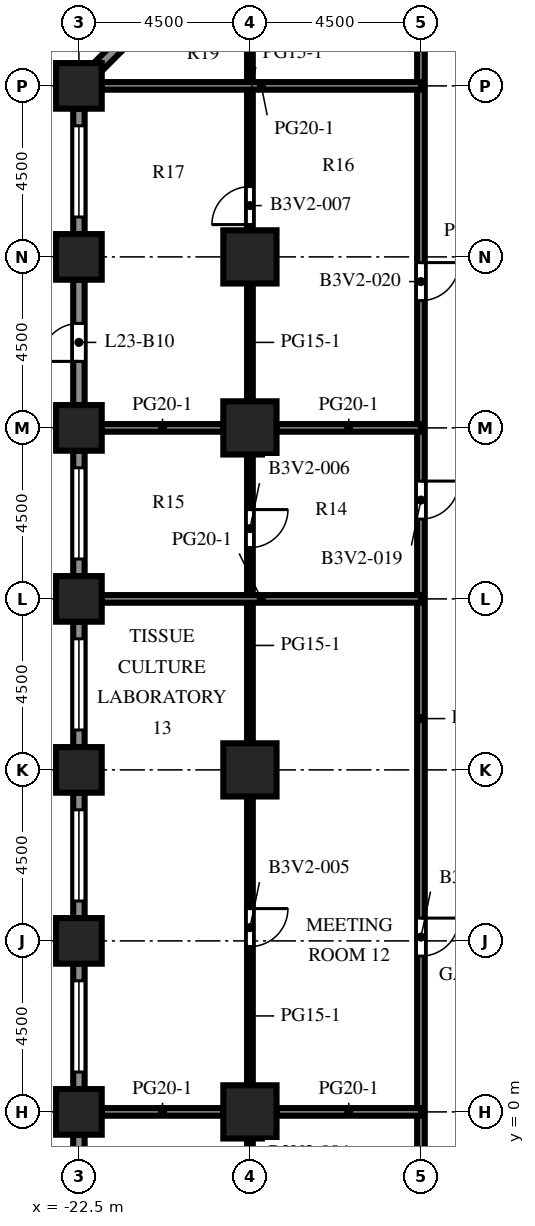
"""IFC4 building model, lengths in metres.
Left out: names, types, materials, properties, quantities, classifications, styles, units other than length and angle.
Written with IfcOpenShell. Run it as: python <this file> out.ifc"""

import sys

from ifc_helpers import new_model, si_unit, direction, frame, frame_2d, origin, origin_2d, place, context, subcontext, project, spatial, rectangle, extrude, element, fill, save


model = new_model("IFC4")
c1 = context("Model", 3, precision=1e-05, world=origin(), true_north=direction((0.0, 1.0)))
c2 = subcontext(c1, "Body", "Model", "MODEL_VIEW")
j1 = project(units=[si_unit("LENGTHUNIT", "METRE"), si_unit("PLANEANGLEUNIT", "RADIAN")], contexts=[c1])
p1 = place(None, origin())
s1 = spatial("IfcSite", under=j1, at=p1, CompositionType="ELEMENT")
p2 = place(p1, origin())
s2 = spatial("IfcBuilding", under=s1, at=p2, CompositionType="ELEMENT")
p3 = place(p2, frame((0.0, 0.0, 102.5)))
s3 = spatial("IfcBuildingStorey", under=s2, at=p3, CompositionType="ELEMENT", Elevation=102.5)
for number, where, z_axis, x_axis in (
    (1, (-22.5, 0.0, 0.0), (0.0, 0.0, 1.0), (1.0, 0.0, 0.0)),
    (2, (-22.5, 4.5, 0.0), (0.0, 0.0, 1.0), (1.0, 0.0, 0.0)),
    (3, (-22.5, 9.0, 0.0), (0.0, 0.0, 1.0), (1.0, 0.0, 0.0)),
    (4, (-22.5, 13.5, 0.0), (0.0, 0.0, 1.0), (1.0, 0.0, 0.0)),
    (5, (-22.5, 18.0, 0.0), (0.0, 0.0, 1.0), (1.0, 0.0, 0.0)),
    (6, (-22.5, 22.5, 0.0), (0.0, 0.0, 1.0), (1.0, 0.0, 0.0)),
    (7, (-22.5, 27.0, 0.0), (0.0, 0.0, 1.0), (1.0, 0.0, 0.0)),
):
    element("IfcColumn", number, at=place(p3, frame(where, z_axis=z_axis, x_axis=x_axis)), inside=s3, PredefinedType="COLUMN", context=c2, shape_type="SweptSolid", body=[
        extrude(rectangle(XDim=1.2, YDim=1.2, at=origin_2d()), origin(), (0.0, 0.0, 1.0), 4.1),
    ])
for number, where, z_axis, x_axis in (
    (8, (-18.0, 0.0, 0.0), (0.0, 0.0, 1.0), (1.0, 0.0, 0.0)),
    (9, (-18.0, 9.0, 0.0), (0.0, 0.0, 1.0), (1.0, 0.0, 0.0)),
    (10, (-18.0, 18.0, 0.0), (0.0, 0.0, 1.0), (1.0, 0.0, 0.0)),
    (11, (-18.0, 22.5, 0.0), (0.0, 0.0, 1.0), (1.0, 0.0, 0.0)),
):
    element("IfcColumn", number, at=place(p3, frame(where, z_axis=z_axis, x_axis=x_axis)), inside=s3, PredefinedType="COLUMN", context=c2, shape_type="SweptSolid", body=[
        extrude(rectangle(XDim=1.4, YDim=1.4, at=origin_2d()), origin(), (0.0, 0.0, 1.0), 4.1),
    ])
p4 = place(p3, frame((-22.006, 27.494, 0.0), z_axis=(0.0, 0.0, 1.0), x_axis=(0.707106781187, 0.707106781187, 0.0)))
e12 = element("IfcWall", 12, at=p4, inside=s3, PredefinedType="SOLIDWALL", context=c2, shape_type="SweptSolid", body=[
    extrude(rectangle(XDim=4.967, YDim=0.3, at=frame_2d((2.483, 0.0))), origin(), (0.0, 0.0, 1.0), 2.75),
])
p5 = place(p4, frame((1.884, 0.0, 0.0)))
e13 = element("IfcOpeningElement", 13, at=p5, cuts=e12, PredefinedType="OPENING", context=c2, shape_type="SweptSolid", body=[
    extrude(rectangle(XDim=1.2, YDim=2.2, at=frame_2d((0.6, 1.1))), frame((0.0, 0.16, 0.0), z_axis=(0.0, -1.0, 0.0), x_axis=(1.0, 0.0, 0.0)), (0.0, 0.0, 1.0), 0.32),
])
p6 = place(p3, frame((-22.5, 23.1, 0.0), z_axis=(0.0, 0.0, 1.0), x_axis=(0.0, 1.0, 0.0)))
e14 = element("IfcWall", 14, at=p6, inside=s3, PredefinedType="SOLIDWALL", context=c2, shape_type="SweptSolid", body=[
    extrude(rectangle(XDim=3.3, YDim=0.3, at=frame_2d((1.65, 0.0))), origin(), (0.0, 0.0, 1.0), 2.75),
])
p7 = place(p6, frame((0.45, 0.0, 0.8)))
e15 = element("IfcOpeningElement", 15, at=p7, cuts=e14, PredefinedType="OPENING", context=c2, shape_type="SweptSolid", body=[
    extrude(rectangle(XDim=2.4, YDim=1.7, at=frame_2d((1.2, 0.85))), frame((0.0, 0.16, 0.0), z_axis=(0.0, -1.0, 0.0), x_axis=(1.0, 0.0, 0.0)), (0.0, 0.0, 1.0), 0.32),
])
p8 = place(p3, frame((-22.5, 18.6, 0.0), z_axis=(0.0, 0.0, 1.0), x_axis=(0.0, 1.0, 0.0)))
e16 = element("IfcWall", 16, at=p8, inside=s3, PredefinedType="SOLIDWALL", context=c2, shape_type="SweptSolid", body=[
    extrude(rectangle(XDim=3.3, YDim=0.3, at=frame_2d((1.65, 0.0))), origin(), (0.0, 0.0, 1.0), 2.75),
])
p9 = place(p8, frame((1.15, 0.0, 0.0)))
e17 = element("IfcOpeningElement", 17, at=p9, cuts=e16, PredefinedType="OPENING", context=c2, shape_type="SweptSolid", body=[
    extrude(rectangle(XDim=1.0, YDim=2.2, at=frame_2d((0.5, 1.1))), frame((0.0, 0.16, 0.0), z_axis=(0.0, -1.0, 0.0), x_axis=(1.0, 0.0, 0.0)), (0.0, 0.0, 1.0), 0.32),
])
p10 = place(p3, frame((-22.5, 14.1, 0.0), z_axis=(0.0, 0.0, 1.0), x_axis=(0.0, 1.0, 0.0)))
e18 = element("IfcWall", 18, at=p10, inside=s3, PredefinedType="SOLIDWALL", context=c2, shape_type="SweptSolid", body=[
    extrude(rectangle(XDim=3.3, YDim=0.3, at=frame_2d((1.65, 0.0))), origin(), (0.0, 0.0, 1.0), 2.75),
])
p11 = place(p10, frame((0.45, 0.0, 0.8)))
e19 = element("IfcOpeningElement", 19, at=p11, cuts=e18, PredefinedType="OPENING", context=c2, shape_type="SweptSolid", body=[
    extrude(rectangle(XDim=2.4, YDim=1.7, at=frame_2d((1.2, 0.85))), frame((0.0, 0.16, 0.0), z_axis=(0.0, -1.0, 0.0), x_axis=(1.0, 0.0, 0.0)), (0.0, 0.0, 1.0), 0.32),
])
p12 = place(p3, frame((-22.5, 9.6, 0.0), z_axis=(0.0, 0.0, 1.0), x_axis=(0.0, 1.0, 0.0)))
e20 = element("IfcWall", 20, at=p12, inside=s3, PredefinedType="SOLIDWALL", context=c2, shape_type="SweptSolid", body=[
    extrude(rectangle(XDim=3.3, YDim=0.3, at=frame_2d((1.65, 0.0))), origin(), (0.0, 0.0, 1.0), 2.75),
])
p13 = place(p12, frame((0.45, 0.0, 0.8)))
e21 = element("IfcOpeningElement", 21, at=p13, cuts=e20, PredefinedType="OPENING", context=c2, shape_type="SweptSolid", body=[
    extrude(rectangle(XDim=2.4, YDim=1.7, at=frame_2d((1.2, 0.85))), frame((0.0, 0.16, 0.0), z_axis=(0.0, -1.0, 0.0), x_axis=(1.0, 0.0, 0.0)), (0.0, 0.0, 1.0), 0.32),
])
p14 = place(p3, frame((-22.5, 5.1, 0.0), z_axis=(0.0, 0.0, 1.0), x_axis=(0.0, 1.0, 0.0)))
e22 = element("IfcWall", 22, at=p14, inside=s3, PredefinedType="SOLIDWALL", context=c2, shape_type="SweptSolid", body=[
    extrude(rectangle(XDim=3.3, YDim=0.3, at=frame_2d((1.65, 0.0))), origin(), (0.0, 0.0, 1.0), 2.75),
])
p15 = place(p14, frame((0.45, 0.0, 0.8)))
e23 = element("IfcOpeningElement", 23, at=p15, cuts=e22, PredefinedType="OPENING", context=c2, shape_type="SweptSolid", body=[
    extrude(rectangle(XDim=2.4, YDim=1.7, at=frame_2d((1.2, 0.85))), frame((0.0, 0.16, 0.0), z_axis=(0.0, -1.0, 0.0), x_axis=(1.0, 0.0, 0.0)), (0.0, 0.0, 1.0), 0.32),
])
p16 = place(p3, frame((-22.5, 0.6, 0.0), z_axis=(0.0, 0.0, 1.0), x_axis=(0.0, 1.0, 0.0)))
e24 = element("IfcWall", 24, at=p16, inside=s3, PredefinedType="SOLIDWALL", context=c2, shape_type="SweptSolid", body=[
    extrude(rectangle(XDim=3.3, YDim=0.3, at=frame_2d((1.65, 0.0))), origin(), (0.0, 0.0, 1.0), 2.75),
])
p17 = place(p16, frame((0.45, 0.0, 0.8)))
e25 = element("IfcOpeningElement", 25, at=p17, cuts=e24, PredefinedType="OPENING", context=c2, shape_type="SweptSolid", body=[
    extrude(rectangle(XDim=2.4, YDim=1.7, at=frame_2d((1.2, 0.85))), frame((0.0, 0.16, 0.0), z_axis=(0.0, -1.0, 0.0), x_axis=(1.0, 0.0, 0.0)), (0.0, 0.0, 1.0), 0.32),
])
p18 = place(p3, frame((-22.5, -3.9, 0.0), z_axis=(0.0, 0.0, 1.0), x_axis=(0.0, 1.0, 0.0)))
e26 = element("IfcWall", 26, at=p18, inside=s3, PredefinedType="SOLIDWALL", context=c2, shape_type="SweptSolid", body=[
    extrude(rectangle(XDim=3.3, YDim=0.3, at=frame_2d((1.65, 0.0))), origin(), (0.0, 0.0, 1.0), 2.75),
])
p19 = place(p18, frame((0.45, 0.0, 0.8)))
e27 = element("IfcOpeningElement", 27, at=p19, cuts=e26, PredefinedType="OPENING", context=c2, shape_type="SweptSolid", body=[
    extrude(rectangle(XDim=2.4, YDim=1.7, at=frame_2d((1.2, 0.85))), frame((0.0, 0.16, 0.0), z_axis=(0.0, -1.0, 0.0), x_axis=(1.0, 0.0, 0.0)), (0.0, 0.0, 1.0), 0.32),
])
p20 = place(p3, frame((-18.0, -8.3, 0.0), z_axis=(0.0, 0.0, 1.0), x_axis=(0.0, 1.0, 0.0)))
e28 = element("IfcWall", 28, at=p20, inside=s3, PredefinedType="PARTITIONING", context=c2, shape_type="SweptSolid", body=[
    extrude(rectangle(XDim=7.6, YDim=0.15, at=frame_2d((3.8, 0.0))), origin(), (0.0, 0.0, 1.0), 3.65),
])
p21 = place(p20, frame((0.15, 0.0, 0.0)))
e29 = element("IfcOpeningElement", 29, at=p21, cuts=e28, PredefinedType="OPENING", context=c2, shape_type="SweptSolid", body=[
    extrude(rectangle(XDim=1.0, YDim=2.1, at=frame_2d((0.5, 1.05))), frame((0.0, 0.085, 0.0), z_axis=(0.0, -1.0, 0.0), x_axis=(1.0, 0.0, 0.0)), (0.0, 0.0, 1.0), 0.17),
])
p22 = place(p20, frame((5.15, 0.0, 0.0)))
e30 = element("IfcOpeningElement", 30, at=p22, cuts=e28, PredefinedType="OPENING", context=c2, shape_type="SweptSolid", body=[
    extrude(rectangle(XDim=1.0, YDim=2.1, at=frame_2d((0.5, 1.05))), frame((0.0, 0.085, 0.0), z_axis=(0.0, -1.0, 0.0), x_axis=(1.0, 0.0, 0.0)), (0.0, 0.0, 1.0), 0.17),
])
p23 = place(p3, frame((-18.0, 0.7, 0.0), z_axis=(0.0, 0.0, 1.0), x_axis=(0.0, 1.0, 0.0)))
e31 = element("IfcWall", 31, at=p23, inside=s3, PredefinedType="PARTITIONING", context=c2, shape_type="SweptSolid", body=[
    extrude(rectangle(XDim=7.6, YDim=0.15, at=frame_2d((3.8, 0.0))), origin(), (0.0, 0.0, 1.0), 3.65),
])
p24 = place(p23, frame((3.65, 0.0, 0.0)))
e32 = element("IfcOpeningElement", 32, at=p24, cuts=e31, PredefinedType="OPENING", context=c2, shape_type="SweptSolid", body=[
    extrude(rectangle(XDim=1.0, YDim=2.1, at=frame_2d((0.5, 1.05))), frame((0.0, 0.085, 0.0), z_axis=(0.0, -1.0, 0.0), x_axis=(1.0, 0.0, 0.0)), (0.0, 0.0, 1.0), 0.17),
])
p25 = place(p3, frame((-18.0, 9.7, 0.0), z_axis=(0.0, 0.0, 1.0), x_axis=(0.0, 1.0, 0.0)))
e33 = element("IfcWall", 33, at=p25, inside=s3, PredefinedType="PARTITIONING", context=c2, shape_type="SweptSolid", body=[
    extrude(rectangle(XDim=7.6, YDim=0.15, at=frame_2d((3.8, 0.0))), origin(), (0.0, 0.0, 1.0), 3.65),
])
p26 = place(p25, frame((5.15, 0.0, 0.0)))
e34 = element("IfcOpeningElement", 34, at=p26, cuts=e33, PredefinedType="OPENING", context=c2, shape_type="SweptSolid", body=[
    extrude(rectangle(XDim=1.0, YDim=2.1, at=frame_2d((0.5, 1.05))), frame((0.0, 0.085, 0.0), z_axis=(0.0, -1.0, 0.0), x_axis=(1.0, 0.0, 0.0)), (0.0, 0.0, 1.0), 0.17),
])
p27 = place(p3, frame((-18.0, 18.7, 0.0), z_axis=(0.0, 0.0, 1.0), x_axis=(0.0, 1.0, 0.0)))
e35 = element("IfcWall", 35, at=p27, inside=s3, PredefinedType="PARTITIONING", context=c2, shape_type="SweptSolid", body=[
    extrude(rectangle(XDim=3.1, YDim=0.15, at=frame_2d((1.55, 0.0))), origin(), (0.0, 0.0, 1.0), 3.65),
])
p28 = place(p3, frame((-18.0, 23.2, 0.0), z_axis=(0.0, 0.0, 1.0), x_axis=(0.0, 1.0, 0.0)))
e36 = element("IfcWall", 36, at=p28, inside=s3, PredefinedType="PARTITIONING", context=c2, shape_type="SweptSolid", body=[
    extrude(rectangle(XDim=7.7, YDim=0.15, at=frame_2d((3.85, 0.0))), origin(), (0.0, 0.0, 1.0), 3.65),
])
p29 = place(p28, frame((0.15, 0.0, 0.0)))
e37 = element("IfcOpeningElement", 37, at=p29, cuts=e36, PredefinedType="OPENING", context=c2, shape_type="SweptSolid", body=[
    extrude(rectangle(XDim=1.0, YDim=2.1, at=frame_2d((0.5, 1.05))), frame((0.0, 0.085, 0.0), z_axis=(0.0, -1.0, 0.0), x_axis=(1.0, 0.0, 0.0)), (0.0, 0.0, 1.0), 0.17),
])
p30 = place(p28, frame((5.9, 0.0, 0.0)))
e38 = element("IfcOpeningElement", 38, at=p30, cuts=e36, PredefinedType="OPENING", context=c2, shape_type="SweptSolid", body=[
    extrude(rectangle(XDim=1.0, YDim=2.1, at=frame_2d((0.5, 1.05))), frame((0.0, 0.085, 0.0), z_axis=(0.0, -1.0, 0.0), x_axis=(1.0, 0.0, 0.0)), (0.0, 0.0, 1.0), 0.17),
])
p31 = place(p3, frame((-13.5, -21.9, 0.0), z_axis=(0.0, 0.0, 1.0), x_axis=(0.0, 1.0, 0.0)))
e39 = element("IfcWall", 39, at=p31, inside=s3, PredefinedType="PARTITIONING", context=c2, shape_type="SweptSolid", body=[
    extrude(rectangle(XDim=52.8, YDim=0.2, at=frame_2d((26.4, 0.0))), origin(), (0.0, 0.0, 1.0), 3.65),
])
p32 = place(p31, frame((0.75, 0.0, 0.0)))
e40 = element("IfcOpeningElement", 40, at=p32, cuts=e39, PredefinedType="OPENING", context=c2, shape_type="SweptSolid", body=[
    extrude(rectangle(XDim=1.0, YDim=2.1, at=frame_2d((0.5, 1.05))), frame((0.0, 0.11, 0.0), z_axis=(0.0, -1.0, 0.0), x_axis=(1.0, 0.0, 0.0)), (0.0, 0.0, 1.0), 0.22),
])
p33 = place(p31, frame((5.0, 0.0, 0.0)))
e41 = element("IfcOpeningElement", 41, at=p33, cuts=e39, PredefinedType="OPENING", context=c2, shape_type="SweptSolid", body=[
    extrude(rectangle(XDim=1.0, YDim=2.1, at=frame_2d((0.5, 1.05))), frame((0.0, 0.11, 0.0), z_axis=(0.0, -1.0, 0.0), x_axis=(1.0, 0.0, 0.0)), (0.0, 0.0, 1.0), 0.22),
])
p34 = place(p31, frame((12.5, 0.0, 0.0)))
e42 = element("IfcOpeningElement", 42, at=p34, cuts=e39, PredefinedType="OPENING", context=c2, shape_type="SweptSolid", body=[
    extrude(rectangle(XDim=1.0, YDim=2.1, at=frame_2d((0.5, 1.05))), frame((0.0, 0.11, 0.0), z_axis=(0.0, -1.0, 0.0), x_axis=(1.0, 0.0, 0.0)), (0.0, 0.0, 1.0), 0.22),
])
p35 = place(p31, frame((19.75, 0.0, 0.0)))
e43 = element("IfcOpeningElement", 43, at=p35, cuts=e39, PredefinedType="OPENING", context=c2, shape_type="SweptSolid", body=[
    extrude(rectangle(XDim=1.0, YDim=2.1, at=frame_2d((0.5, 1.05))), frame((0.0, 0.11, 0.0), z_axis=(0.0, -1.0, 0.0), x_axis=(1.0, 0.0, 0.0)), (0.0, 0.0, 1.0), 0.22),
])
p36 = place(p31, frame((26.0, 0.0, 0.0)))
e44 = element("IfcOpeningElement", 44, at=p36, cuts=e39, PredefinedType="OPENING", context=c2, shape_type="SweptSolid", body=[
    extrude(rectangle(XDim=1.0, YDim=2.1, at=frame_2d((0.5, 1.05))), frame((0.0, 0.11, 0.0), z_axis=(0.0, -1.0, 0.0), x_axis=(1.0, 0.0, 0.0)), (0.0, 0.0, 1.0), 0.22),
])
p37 = place(p31, frame((37.5, 0.0, 0.0)))
e45 = element("IfcOpeningElement", 45, at=p37, cuts=e39, PredefinedType="OPENING", context=c2, shape_type="SweptSolid", body=[
    extrude(rectangle(XDim=1.0, YDim=2.1, at=frame_2d((0.5, 1.05))), frame((0.0, 0.11, 0.0), z_axis=(0.0, -1.0, 0.0), x_axis=(1.0, 0.0, 0.0)), (0.0, 0.0, 1.0), 0.22),
])
p38 = place(p31, frame((43.25, 0.0, 0.0)))
e46 = element("IfcOpeningElement", 46, at=p38, cuts=e39, PredefinedType="OPENING", context=c2, shape_type="SweptSolid", body=[
    extrude(rectangle(XDim=1.0, YDim=2.1, at=frame_2d((0.5, 1.05))), frame((0.0, 0.11, 0.0), z_axis=(0.0, -1.0, 0.0), x_axis=(1.0, 0.0, 0.0)), (0.0, 0.0, 1.0), 0.22),
])
p39 = place(p31, frame((50.0, 0.0, 0.0)))
e47 = element("IfcOpeningElement", 47, at=p39, cuts=e39, PredefinedType="OPENING", context=c2, shape_type="SweptSolid", body=[
    extrude(rectangle(XDim=1.0, YDim=2.1, at=frame_2d((0.5, 1.05))), frame((0.0, 0.11, 0.0), z_axis=(0.0, -1.0, 0.0), x_axis=(1.0, 0.0, 0.0)), (0.0, 0.0, 1.0), 0.22),
])
p40 = place(p3, frame((-21.9, 0.0, 0.0), z_axis=(0.0, 0.0, 1.0), x_axis=(1.0, 0.0, 0.0)))
e48 = element("IfcWall", 48, at=p40, inside=s3, PredefinedType="PARTITIONING", context=c2, shape_type="SweptSolid", body=[
    extrude(rectangle(XDim=3.2, YDim=0.2, at=frame_2d((1.6, 0.0))), origin(), (0.0, 0.0, 1.0), 3.65),
])
p41 = place(p3, frame((-17.3, 0.0, 0.0), z_axis=(0.0, 0.0, 1.0), x_axis=(1.0, 0.0, 0.0)))
e49 = element("IfcWall", 49, at=p41, inside=s3, PredefinedType="PARTITIONING", context=c2, shape_type="SweptSolid", body=[
    extrude(rectangle(XDim=3.8, YDim=0.2, at=frame_2d((1.9, 0.0))), origin(), (0.0, 0.0, 1.0), 3.65),
])
p42 = place(p3, frame((-21.9, 13.5, 0.0), z_axis=(0.0, 0.0, 1.0), x_axis=(1.0, 0.0, 0.0)))
e50 = element("IfcWall", 50, at=p42, inside=s3, PredefinedType="PARTITIONING", context=c2, shape_type="SweptSolid", body=[
    extrude(rectangle(XDim=8.4, YDim=0.2, at=frame_2d((4.2, 0.0))), origin(), (0.0, 0.0, 1.0), 3.65),
])
p43 = place(p3, frame((-21.9, 18.0, 0.0), z_axis=(0.0, 0.0, 1.0), x_axis=(1.0, 0.0, 0.0)))
e51 = element("IfcWall", 51, at=p43, inside=s3, PredefinedType="PARTITIONING", context=c2, shape_type="SweptSolid", body=[
    extrude(rectangle(XDim=3.2, YDim=0.2, at=frame_2d((1.6, 0.0))), origin(), (0.0, 0.0, 1.0), 3.65),
])
p44 = place(p3, frame((-17.3, 18.0, 0.0), z_axis=(0.0, 0.0, 1.0), x_axis=(1.0, 0.0, 0.0)))
e52 = element("IfcWall", 52, at=p44, inside=s3, PredefinedType="PARTITIONING", context=c2, shape_type="SweptSolid", body=[
    extrude(rectangle(XDim=3.8, YDim=0.2, at=frame_2d((1.9, 0.0))), origin(), (0.0, 0.0, 1.0), 3.65),
])
p45 = place(p3, frame((-21.9, 27.0, 0.0), z_axis=(0.0, 0.0, 1.0), x_axis=(1.0, 0.0, 0.0)))
e53 = element("IfcWall", 53, at=p45, inside=s3, PredefinedType="PARTITIONING", context=c2, shape_type="SweptSolid", body=[
    extrude(rectangle(XDim=8.4, YDim=0.2, at=frame_2d((4.2, 0.0))), origin(), (0.0, 0.0, 1.0), 3.65),
])
p46 = place(p7, origin())
e54 = element("IfcWindow", 54, at=p46, inside=s3, PartitioningType="SINGLE_PANEL", PredefinedType="WINDOW", context=c2, shape_type="SweptSolid", body=[
    extrude(rectangle(XDim=2.4, YDim=1.7, at=frame_2d((1.2, 0.85))), frame((0.0, 0.03, 0.0), z_axis=(0.0, -1.0, 0.0), x_axis=(1.0, 0.0, 0.0)), (0.0, 0.0, 1.0), 0.06),
])
fill(e15, e54)
p47 = place(p9, origin())
e55 = element("IfcDoor", 55, at=p47, inside=s3, OperationType="SINGLE_SWING_LEFT", PredefinedType="DOOR", context=c2, shape_type="SweptSolid", body=[
    extrude(rectangle(XDim=1.0, YDim=2.2, at=frame_2d((0.5, 1.1))), frame((0.0, 0.025, 0.0), z_axis=(0.0, -1.0, 0.0), x_axis=(1.0, 0.0, 0.0)), (0.0, 0.0, 1.0), 0.05),
])
fill(e17, e55)
p48 = place(p11, origin())
e56 = element("IfcWindow", 56, at=p48, inside=s3, PartitioningType="SINGLE_PANEL", PredefinedType="WINDOW", context=c2, shape_type="SweptSolid", body=[
    extrude(rectangle(XDim=2.4, YDim=1.7, at=frame_2d((1.2, 0.85))), frame((0.0, 0.03, 0.0), z_axis=(0.0, -1.0, 0.0), x_axis=(1.0, 0.0, 0.0)), (0.0, 0.0, 1.0), 0.06),
])
fill(e19, e56)
p49 = place(p13, origin())
e57 = element("IfcWindow", 57, at=p49, inside=s3, PartitioningType="SINGLE_PANEL", PredefinedType="WINDOW", context=c2, shape_type="SweptSolid", body=[
    extrude(rectangle(XDim=2.4, YDim=1.7, at=frame_2d((1.2, 0.85))), frame((0.0, 0.03, 0.0), z_axis=(0.0, -1.0, 0.0), x_axis=(1.0, 0.0, 0.0)), (0.0, 0.0, 1.0), 0.06),
])
fill(e21, e57)
p50 = place(p15, origin())
e58 = element("IfcWindow", 58, at=p50, inside=s3, PartitioningType="SINGLE_PANEL", PredefinedType="WINDOW", context=c2, shape_type="SweptSolid", body=[
    extrude(rectangle(XDim=2.4, YDim=1.7, at=frame_2d((1.2, 0.85))), frame((0.0, 0.03, 0.0), z_axis=(0.0, -1.0, 0.0), x_axis=(1.0, 0.0, 0.0)), (0.0, 0.0, 1.0), 0.06),
])
fill(e23, e58)
p51 = place(p17, origin())
e59 = element("IfcWindow", 59, at=p51, inside=s3, PartitioningType="SINGLE_PANEL", PredefinedType="WINDOW", context=c2, shape_type="SweptSolid", body=[
    extrude(rectangle(XDim=2.4, YDim=1.7, at=frame_2d((1.2, 0.85))), frame((0.0, 0.03, 0.0), z_axis=(0.0, -1.0, 0.0), x_axis=(1.0, 0.0, 0.0)), (0.0, 0.0, 1.0), 0.06),
])
fill(e25, e59)
p52 = place(p24, origin())
e60 = element("IfcDoor", 60, at=p52, inside=s3, OperationType="SINGLE_SWING_RIGHT", PredefinedType="DOOR", context=c2, shape_type="SweptSolid", body=[
    extrude(rectangle(XDim=1.0, YDim=2.1, at=frame_2d((0.5, 1.05))), frame((0.0, 0.025, 0.0), z_axis=(0.0, -1.0, 0.0), x_axis=(1.0, 0.0, 0.0)), (0.0, 0.0, 1.0), 0.05),
])
fill(e32, e60)
p53 = place(p26, origin())
e61 = element("IfcDoor", 61, at=p53, inside=s3, OperationType="SINGLE_SWING_RIGHT", PredefinedType="DOOR", context=c2, shape_type="SweptSolid", body=[
    extrude(rectangle(XDim=1.0, YDim=2.1, at=frame_2d((0.5, 1.05))), frame((0.0, 0.025, 0.0), z_axis=(0.0, -1.0, 0.0), x_axis=(1.0, 0.0, 0.0)), (0.0, 0.0, 1.0), 0.05),
])
fill(e34, e61)
p54 = place(p29, origin())
e62 = element("IfcDoor", 62, at=p54, inside=s3, OperationType="SINGLE_SWING_LEFT", PredefinedType="DOOR", context=c2, shape_type="SweptSolid", body=[
    extrude(rectangle(XDim=1.0, YDim=2.1, at=frame_2d((0.5, 1.05))), frame((0.0, 0.025, 0.0), z_axis=(0.0, -1.0, 0.0), x_axis=(1.0, 0.0, 0.0)), (0.0, 0.0, 1.0), 0.05),
])
fill(e37, e62)
p55 = place(p36, origin())
e63 = element("IfcDoor", 63, at=p55, inside=s3, OperationType="SINGLE_SWING_RIGHT", PredefinedType="DOOR", context=c2, shape_type="SweptSolid", body=[
    extrude(rectangle(XDim=1.0, YDim=2.1, at=frame_2d((0.5, 1.05))), frame((0.0, 0.025, 0.0), z_axis=(0.0, -1.0, 0.0), x_axis=(1.0, 0.0, 0.0)), (0.0, 0.0, 1.0), 0.05),
])
fill(e44, e63)
p56 = place(p37, origin())
e64 = element("IfcDoor", 64, at=p56, inside=s3, OperationType="SINGLE_SWING_RIGHT", PredefinedType="DOOR", context=c2, shape_type="SweptSolid", body=[
    extrude(rectangle(XDim=1.0, YDim=2.1, at=frame_2d((0.5, 1.05))), frame((0.0, 0.025, 0.0), z_axis=(0.0, -1.0, 0.0), x_axis=(1.0, 0.0, 0.0)), (0.0, 0.0, 1.0), 0.05),
])
fill(e45, e64)
p57 = place(p38, origin())
e65 = element("IfcDoor", 65, at=p57, inside=s3, OperationType="SINGLE_SWING_RIGHT", PredefinedType="DOOR", context=c2, shape_type="SweptSolid", body=[
    extrude(rectangle(XDim=1.0, YDim=2.1, at=frame_2d((0.5, 1.05))), frame((0.0, 0.025, 0.0), z_axis=(0.0, -1.0, 0.0), x_axis=(1.0, 0.0, 0.0)), (0.0, 0.0, 1.0), 0.05),
])
fill(e46, e65)
save(model, sys.argv[1])
